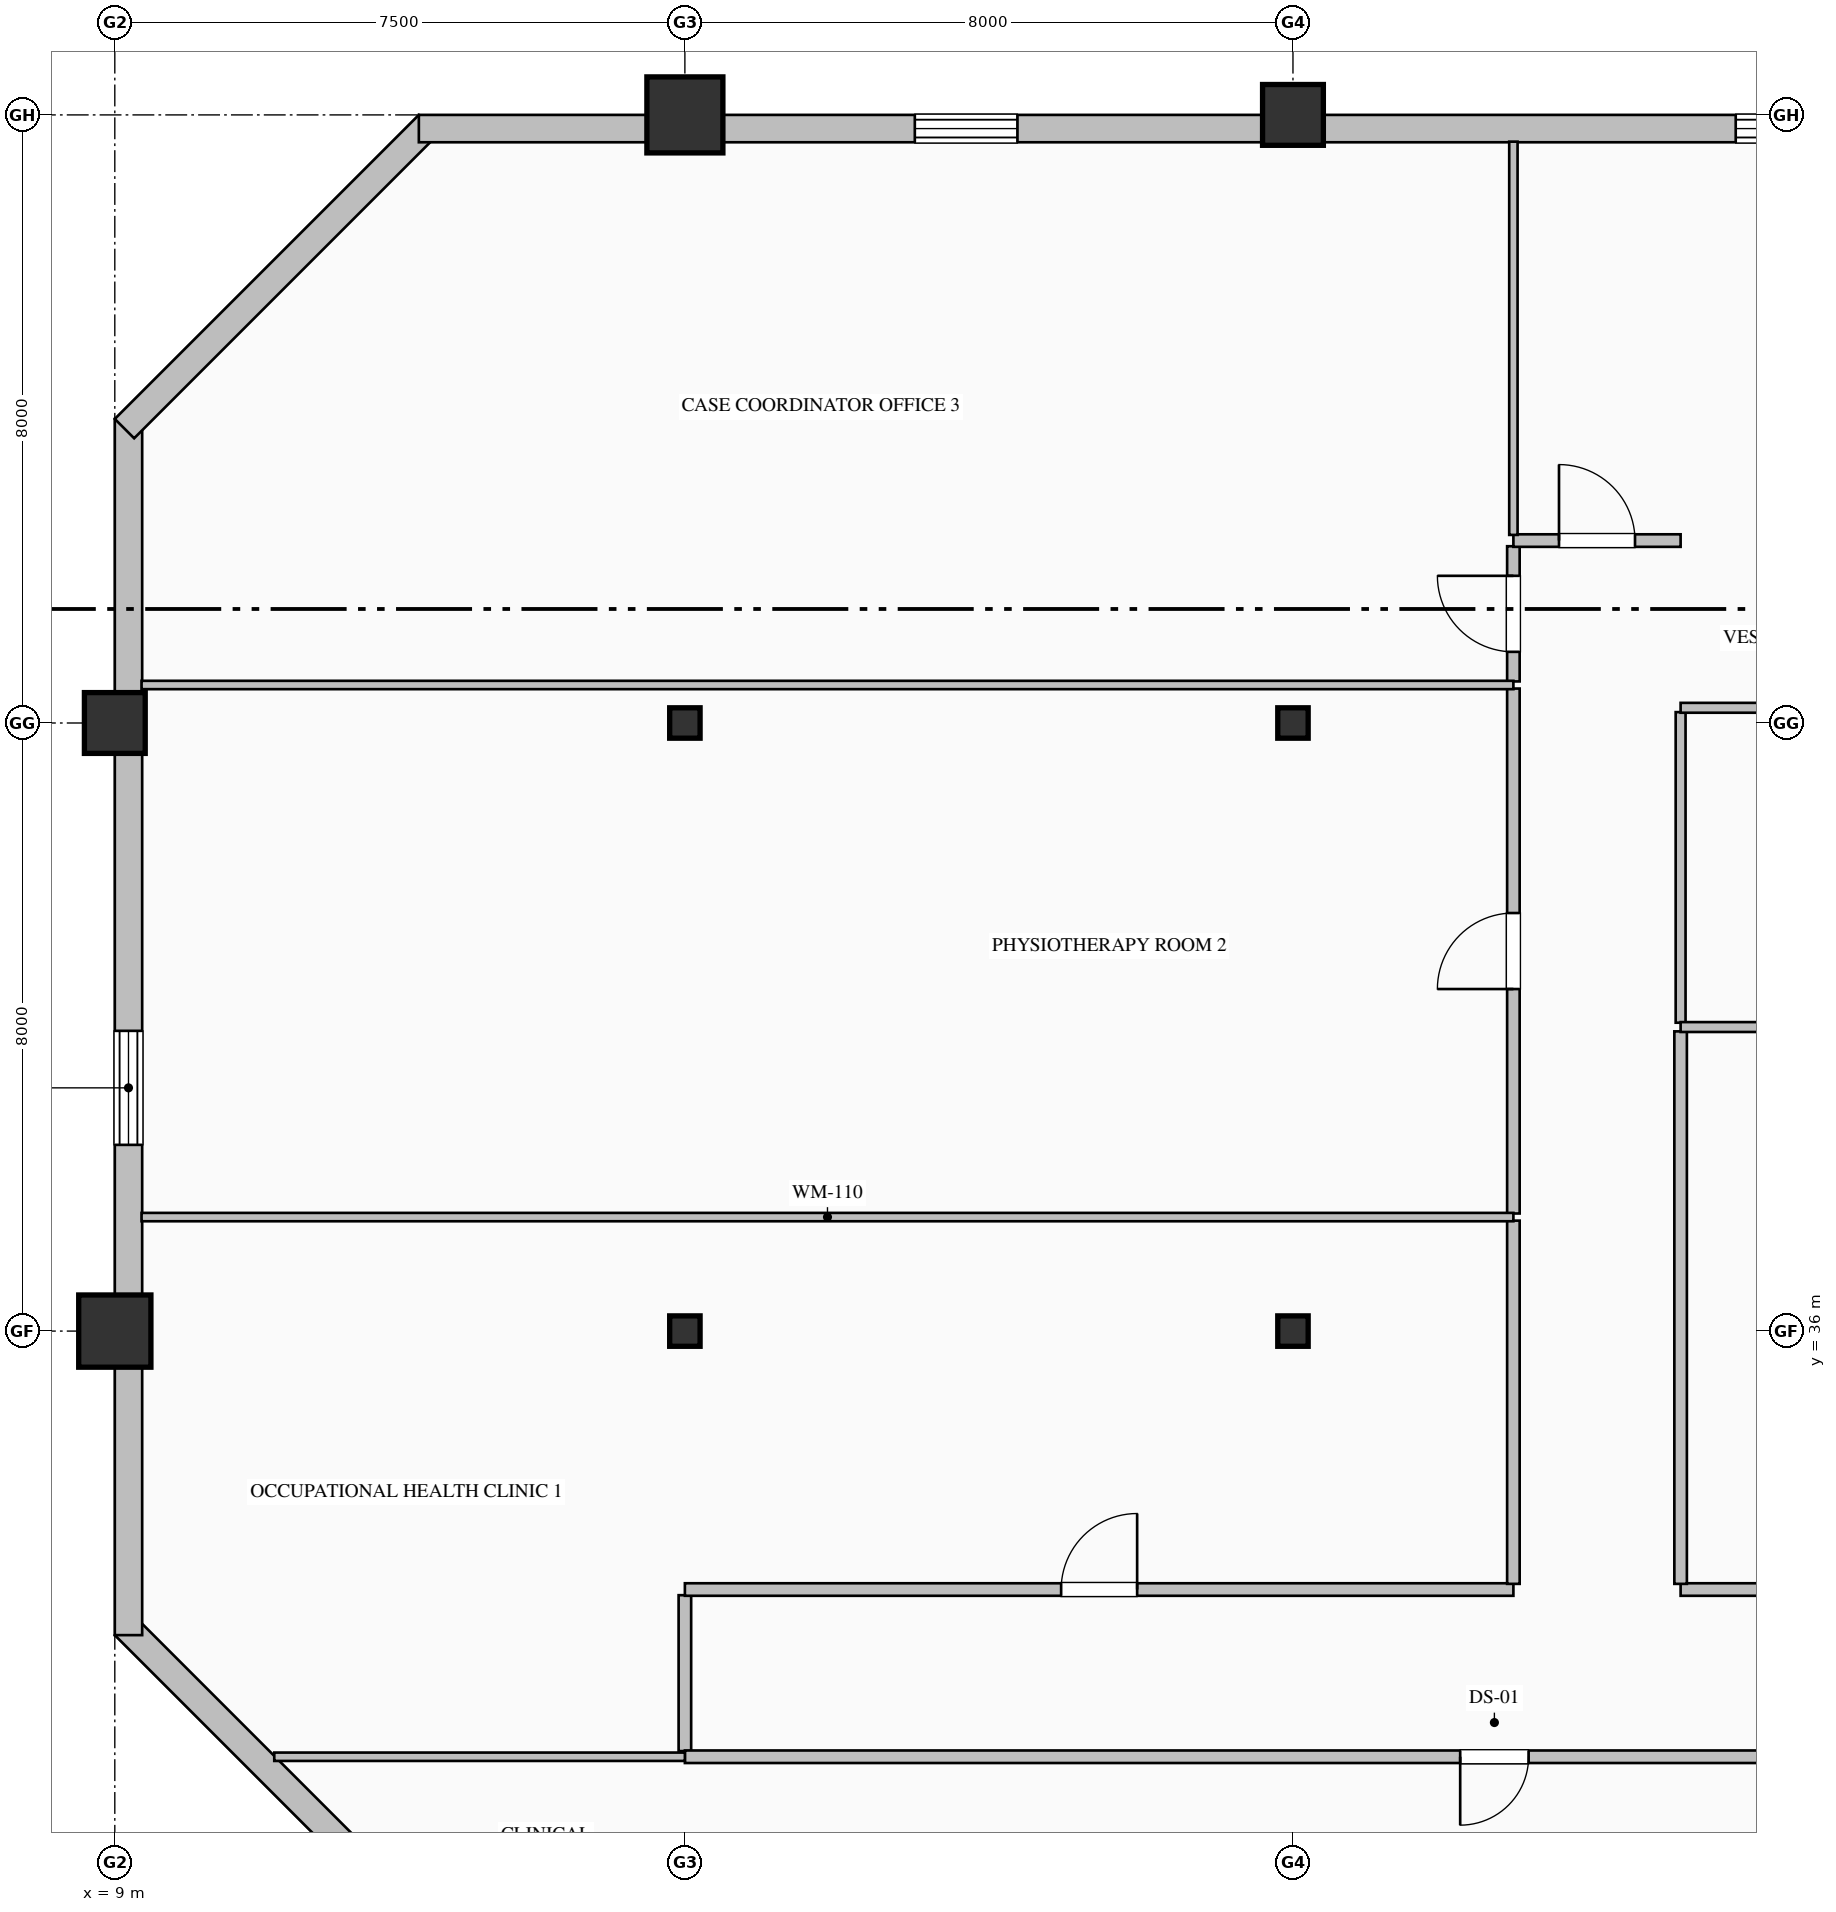
"""IFC4 building model, lengths in metres.
Left out: names, types, materials, properties, quantities, classifications, styles, units other than length and angle.
Written with IfcOpenShell. Run it as: python <this file> out.ifc"""

import sys

from ifc_helpers import new_model, si_unit, direction, frame, frame_2d, origin, origin_2d, place, context, subcontext, project, spatial, rectangle, hollow_rectangle, hollow_circle, i_section, extrude, element, fill, save


model = new_model("IFC4")
c1 = context("Model", 3, precision=1e-05, world=origin(), true_north=direction((0.0, 1.0)))
c2 = subcontext(c1, "Body", "Model", "MODEL_VIEW")
j1 = project(units=[si_unit("LENGTHUNIT", "METRE"), si_unit("PLANEANGLEUNIT", "RADIAN")], contexts=[c1])
p1 = place(None, origin())
s1 = spatial("IfcSite", under=j1, at=p1, CompositionType="ELEMENT")
p2 = place(p1, origin())
s2 = spatial("IfcBuilding", under=s1, at=p2, CompositionType="ELEMENT")
p3 = place(p2, frame((0.0, 0.0, 253.8)))
s3 = spatial("IfcBuildingStorey", under=s2, at=p3, CompositionType="ELEMENT", Elevation=253.8)
p4 = place(p3, frame((9.0, 36.0, 0.0), z_axis=(0.0, 0.0, 1.0), x_axis=(1.0, 0.0, 0.0)))
e1 = element("IfcColumn", 1, at=p4, inside=s3, PredefinedType="COLUMN", context=c2, shape_type="SweptSolid", body=[
    extrude(hollow_rectangle(XDim=0.95, YDim=0.95, WallThickness=0.036, at=origin_2d()), origin(), (0.0, 0.0, 1.0), 4.0),
])
p5 = place(p3, frame((9.0, 44.0, 0.0), z_axis=(0.0, 0.0, 1.0), x_axis=(1.0, 0.0, 0.0)))
e2 = element("IfcColumn", 2, at=p5, inside=s3, PredefinedType="COLUMN", context=c2, shape_type="SweptSolid", body=[
    extrude(hollow_rectangle(XDim=0.8, YDim=0.8, WallThickness=0.032, at=origin_2d()), origin(), (0.0, 0.0, 1.0), 4.0),
])
for number, where, z_axis, x_axis in (
    (3, (16.5, 36.0, 0.0), (0.0, 0.0, 1.0), (1.0, 0.0, 0.0)),
    (4, (16.5, 44.0, 0.0), (0.0, 0.0, 1.0), (1.0, 0.0, 0.0)),
):
    element("IfcColumn", number, at=place(p3, frame(where, z_axis=z_axis, x_axis=x_axis)), inside=s3, PredefinedType="COLUMN", context=c2, shape_type="SweptSolid", body=[
        extrude(i_section(OverallWidth=0.4, OverallDepth=0.4, WebThickness=0.013, FlangeThickness=0.021, FilletRadius=0.022, at=origin_2d()), origin(), (0.0, 0.0, 1.0), 4.0),
    ])
p6 = place(p3, frame((16.5, 52.0, 0.0), z_axis=(0.0, 0.0, 1.0), x_axis=(1.0, 0.0, 0.0)))
e5 = element("IfcColumn", 5, at=p6, inside=s3, PredefinedType="COLUMN", context=c2, shape_type="SweptSolid", body=[
    extrude(hollow_circle(Radius=0.5, WallThickness=0.036, at=origin_2d()), origin(), (0.0, 0.0, 1.0), 4.0),
])
for number, where, z_axis, x_axis in (
    (6, (24.5, 36.0, 0.0), (0.0, 0.0, 1.0), (1.0, 0.0, 0.0)),
    (7, (24.5, 44.0, 0.0), (0.0, 0.0, 1.0), (1.0, 0.0, 0.0)),
):
    element("IfcColumn", number, at=place(p3, frame(where, z_axis=z_axis, x_axis=x_axis)), inside=s3, PredefinedType="COLUMN", context=c2, shape_type="SweptSolid", body=[
        extrude(i_section(OverallWidth=0.4, OverallDepth=0.4, WebThickness=0.013, FlangeThickness=0.021, FilletRadius=0.022, at=origin_2d()), origin(), (0.0, 0.0, 1.0), 4.0),
    ])
p7 = place(p3, frame((24.5, 52.0, 0.0), z_axis=(0.0, 0.0, 1.0), x_axis=(1.0, 0.0, 0.0)))
e8 = element("IfcColumn", 8, at=p7, inside=s3, PredefinedType="COLUMN", context=c2, shape_type="SweptSolid", body=[
    extrude(hollow_rectangle(XDim=0.8, YDim=0.8, WallThickness=0.032, at=origin_2d()), origin(), (0.0, 0.0, 1.0), 4.0),
])
p8 = place(p3, frame((13.127, 28.127, 0.0), z_axis=(0.0, 0.0, 1.0), x_axis=(-0.707106781187, 0.707106781187, 0.0)))
e9 = element("IfcWall", 9, at=p8, inside=s3, PredefinedType="SOLIDWALL", context=c2, shape_type="SweptSolid", body=[
    extrude(rectangle(XDim=5.657, YDim=0.36, at=frame_2d((2.828, 0.0))), origin(), (0.0, 0.0, 1.0), 3.775),
])
p9 = place(p3, frame((9.18, 32.0, 0.0), z_axis=(0.0, 0.0, 1.0), x_axis=(0.0, 1.0, 0.0)))
e10 = element("IfcWall", 10, at=p9, inside=s3, PredefinedType="SOLIDWALL", context=c2, shape_type="SweptSolid", body=[
    extrude(rectangle(XDim=16.0, YDim=0.36, at=frame_2d((8.0, 0.0))), origin(), (0.0, 0.0, 1.0), 3.325),
])
p10 = place(p9, frame((6.45, 0.0, 0.7)))
e11 = element("IfcOpeningElement", 11, at=p10, cuts=e10, PredefinedType="OPENING", context=c2, shape_type="SweptSolid", body=[
    extrude(rectangle(XDim=1.5, YDim=2.4, at=frame_2d((0.75, 1.2))), frame((0.0, 0.19, 0.0), z_axis=(0.0, -1.0, 0.0), x_axis=(1.0, 0.0, 0.0)), (0.0, 0.0, 1.0), 0.38),
])
p11 = place(p3, frame((9.127, 47.873, 0.0), z_axis=(0.0, 0.0, 1.0), x_axis=(0.707106781187, 0.707106781187, 0.0)))
e12 = element("IfcWall", 12, at=p11, inside=s3, PredefinedType="SOLIDWALL", context=c2, shape_type="SweptSolid", body=[
    extrude(rectangle(XDim=5.657, YDim=0.36, at=frame_2d((2.828, 0.0))), origin(), (0.0, 0.0, 1.0), 3.775),
])
p12 = place(p3, frame((13.0, 51.82, 0.0), z_axis=(0.0, 0.0, 1.0), x_axis=(1.0, 0.0, 0.0)))
e13 = element("IfcWall", 13, at=p12, inside=s3, PredefinedType="SOLIDWALL", context=c2, shape_type="SweptSolid", body=[
    extrude(rectangle(XDim=27.52, YDim=0.36, at=frame_2d((13.76, 0.0))), origin(), (0.0, 0.0, 1.0), 3.325),
])
p13 = place(p12, frame((6.525, 0.0, 0.9)))
e14 = element("IfcOpeningElement", 14, at=p13, cuts=e13, PredefinedType="OPENING", context=c2, shape_type="SweptSolid", body=[
    extrude(rectangle(XDim=1.35, YDim=1.85, at=frame_2d((0.675, 0.925))), frame((0.0, 0.19, 0.0), z_axis=(0.0, -1.0, 0.0), x_axis=(1.0, 0.0, 0.0)), (0.0, 0.0, 1.0), 0.38),
])
p14 = place(p12, frame((17.325, 0.0, 0.9)))
e15 = element("IfcOpeningElement", 15, at=p14, cuts=e13, PredefinedType="OPENING", context=c2, shape_type="SweptSolid", body=[
    extrude(rectangle(XDim=1.35, YDim=1.85, at=frame_2d((0.675, 0.925))), frame((0.0, 0.19, 0.0), z_axis=(0.0, -1.0, 0.0), x_axis=(1.0, 0.0, 0.0)), (0.0, 0.0, 1.0), 0.38),
])
p15 = place(p3, frame((16.5, 30.475, 0.0), z_axis=(0.0, 0.0, 1.0), x_axis=(0.0, 1.0, 0.0)))
e16 = element("IfcWall", 16, at=p15, inside=s3, PredefinedType="PARTITIONING", context=c2, shape_type="SweptSolid", body=[
    extrude(rectangle(XDim=2.051, YDim=0.165, at=frame_2d((1.025, 0.0))), origin(), (0.0, 0.0, 1.0), 3.179),
])
p16 = place(p3, frame((16.5, 32.6, 0.0), z_axis=(0.0, 0.0, 1.0), x_axis=(1.0, 0.0, 0.0)))
e17 = element("IfcWall", 17, at=p16, inside=s3, PredefinedType="PARTITIONING", context=c2, shape_type="SweptSolid", body=[
    extrude(rectangle(XDim=10.9, YDim=0.165, at=frame_2d((5.45, 0.0))), origin(), (0.0, 0.0, 1.0), 3.775),
])
p17 = place(p16, frame((4.95, 0.0, 0.0)))
e18 = element("IfcOpeningElement", 18, at=p17, cuts=e17, PredefinedType="OPENING", context=c2, shape_type="SweptSolid", body=[
    extrude(rectangle(XDim=1.0, YDim=2.15, at=frame_2d((0.5, 1.075))), frame((0.0, 0.093, 0.0), z_axis=(0.0, -1.0, 0.0), x_axis=(1.0, 0.0, 0.0)), (0.0, 0.0, 1.0), 0.185),
])
p18 = place(p3, frame((29.6, 32.6, 0.0), z_axis=(0.0, 0.0, 1.0), x_axis=(1.0, 0.0, 0.0)))
e19 = element("IfcWall", 19, at=p18, inside=s3, PredefinedType="PARTITIONING", context=c2, shape_type="SweptSolid", body=[
    extrude(rectangle(XDim=8.2, YDim=0.165, at=frame_2d((4.1, 0.0))), origin(), (0.0, 0.0, 1.0), 3.775),
])
p19 = place(p18, frame((3.6, 0.0, 0.0)))
e20 = element("IfcOpeningElement", 20, at=p19, cuts=e19, PredefinedType="OPENING", context=c2, shape_type="SweptSolid", body=[
    extrude(rectangle(XDim=1.0, YDim=2.15, at=frame_2d((0.5, 1.075))), frame((0.0, 0.093, 0.0), z_axis=(0.0, -1.0, 0.0), x_axis=(1.0, 0.0, 0.0)), (0.0, 0.0, 1.0), 0.185),
])
p20 = place(p3, frame((37.8, 30.4, 0.0), z_axis=(0.0, 0.0, 1.0), x_axis=(-1.0, 0.0, 0.0)))
e21 = element("IfcWall", 21, at=p20, inside=s3, PredefinedType="PARTITIONING", context=c2, shape_type="SweptSolid", body=[
    extrude(rectangle(XDim=21.3, YDim=0.165, at=frame_2d((10.65, 0.0))), origin(), (0.0, 0.0, 1.0), 3.775),
])
p21 = place(p20, frame((10.2, 0.0, 0.0)))
e22 = element("IfcOpeningElement", 22, at=p21, cuts=e21, PredefinedType="OPENING", context=c2, shape_type="SweptSolid", body=[
    extrude(rectangle(XDim=0.9, YDim=2.15, at=frame_2d((0.45, 1.075))), frame((0.0, 0.093, 0.0), z_axis=(0.0, -1.0, 0.0), x_axis=(1.0, 0.0, 0.0)), (0.0, 0.0, 1.0), 0.185),
])
p22 = place(p3, frame((27.4, 32.675, 0.0), z_axis=(0.0, 0.0, 1.0), x_axis=(0.0, 1.0, 0.0)))
e23 = element("IfcWall", 23, at=p22, inside=s3, PredefinedType="PARTITIONING", context=c2, shape_type="SweptSolid", body=[
    extrude(rectangle(XDim=4.778, YDim=0.165, at=frame_2d((2.389, 0.0))), origin(), (0.0, 0.0, 1.0), 3.775),
])
p23 = place(p3, frame((27.4, 37.547, 0.0), z_axis=(0.0, 0.0, 1.0), x_axis=(0.0, 1.0, 0.0)))
e24 = element("IfcWall", 24, at=p23, inside=s3, PredefinedType="PARTITIONING", context=c2, shape_type="SweptSolid", body=[
    extrude(rectangle(XDim=6.906, YDim=0.165, at=frame_2d((3.453, 0.0))), origin(), (0.0, 0.0, 1.0), 3.775),
])
p24 = place(p23, frame((2.953, 0.0, 0.0)))
e25 = element("IfcOpeningElement", 25, at=p24, cuts=e24, PredefinedType="OPENING", context=c2, shape_type="SweptSolid", body=[
    extrude(rectangle(XDim=1.0, YDim=2.15, at=frame_2d((0.5, 1.075))), frame((0.0, 0.093, 0.0), z_axis=(0.0, -1.0, 0.0), x_axis=(1.0, 0.0, 0.0)), (0.0, 0.0, 1.0), 0.185),
])
p25 = place(p3, frame((27.4, 44.547, 0.0), z_axis=(0.0, 0.0, 1.0), x_axis=(0.0, 1.0, 0.0)))
e26 = element("IfcWall", 26, at=p25, inside=s3, PredefinedType="PARTITIONING", context=c2, shape_type="SweptSolid", body=[
    extrude(rectangle(XDim=1.778, YDim=0.165, at=frame_2d((0.889, 0.0))), origin(), (0.0, 0.0, 1.0), 3.775),
])
p26 = place(p25, frame((0.389, 0.0, 0.0)))
e27 = element("IfcOpeningElement", 27, at=p26, cuts=e26, PredefinedType="OPENING", context=c2, shape_type="SweptSolid", body=[
    extrude(rectangle(XDim=1.0, YDim=2.15, at=frame_2d((0.5, 1.075))), frame((0.0, 0.093, 0.0), z_axis=(0.0, -1.0, 0.0), x_axis=(1.0, 0.0, 0.0)), (0.0, 0.0, 1.0), 0.185),
])
p27 = place(p3, frame((27.4, 46.4, 0.0), z_axis=(0.0, 0.0, 1.0), x_axis=(1.0, 0.0, 0.0)))
e28 = element("IfcWall", 28, at=p27, inside=s3, PredefinedType="PARTITIONING", context=c2, shape_type="SweptSolid", body=[
    extrude(rectangle(XDim=2.2, YDim=0.165, at=frame_2d((1.1, 0.0))), origin(), (0.0, 0.0, 1.0), 3.775),
])
p28 = place(p27, frame((0.6, 0.0, 0.0)))
e29 = element("IfcOpeningElement", 29, at=p28, cuts=e28, PredefinedType="OPENING", context=c2, shape_type="SweptSolid", body=[
    extrude(rectangle(XDim=1.0, YDim=2.15, at=frame_2d((0.5, 1.075))), frame((0.0, 0.093, 0.0), z_axis=(0.0, -1.0, 0.0), x_axis=(1.0, 0.0, 0.0)), (0.0, 0.0, 1.0), 0.185),
])
p29 = place(p3, frame((29.6, 39.943, 0.0), z_axis=(0.0, 0.0, 1.0), x_axis=(0.0, -1.0, 0.0)))
e30 = element("IfcWall", 30, at=p29, inside=s3, PredefinedType="PARTITIONING", context=c2, shape_type="SweptSolid", body=[
    extrude(rectangle(XDim=7.269, YDim=0.165, at=frame_2d((3.634, 0.0))), origin(), (0.0, 0.0, 1.0), 3.775),
])
p30 = place(p3, frame((29.6, 44.143, 0.0), z_axis=(0.0, 0.0, 1.0), x_axis=(0.0, -1.0, 0.0)))
e31 = element("IfcWall", 31, at=p30, inside=s3, PredefinedType="PARTITIONING", context=c2, shape_type="SweptSolid", body=[
    extrude(rectangle(XDim=4.086, YDim=0.13, at=frame_2d((2.043, 0.0))), origin(), (0.0, 0.0, 1.0), 3.775),
])
p31 = place(p3, frame((37.8, 44.2, 0.0), z_axis=(0.0, 0.0, 1.0), x_axis=(-1.0, 0.0, 0.0)))
e32 = element("IfcWall", 32, at=p31, inside=s3, PredefinedType="PARTITIONING", context=c2, shape_type="SweptSolid", body=[
    extrude(rectangle(XDim=8.2, YDim=0.13, at=frame_2d((4.1, 0.0))), origin(), (0.0, 0.0, 1.0), 3.775),
])
p32 = place(p31, frame((3.6, 0.0, 0.0)))
e33 = element("IfcOpeningElement", 33, at=p32, cuts=e32, PredefinedType="OPENING", context=c2, shape_type="SweptSolid", body=[
    extrude(rectangle(XDim=1.0, YDim=2.15, at=frame_2d((0.5, 1.075))), frame((0.0, 0.075, 0.0), z_axis=(0.0, -1.0, 0.0), x_axis=(1.0, 0.0, 0.0)), (0.0, 0.0, 1.0), 0.15),
])
p33 = place(p3, frame((9.352, 37.5, 0.0), z_axis=(0.0, 0.0, 1.0), x_axis=(1.0, 0.0, 0.0)))
e34 = element("IfcWall", 34, at=p33, inside=s3, PredefinedType="MOVABLE", context=c2, shape_type="SweptSolid", body=[
    extrude(rectangle(XDim=18.048, YDim=0.11, at=frame_2d((9.024, 0.0))), origin(), (0.0, 0.0, 1.0), 3.775),
])
p34 = place(p3, frame((16.5, 30.4, 0.0), z_axis=(0.0, 0.0, 1.0), x_axis=(-1.0, 0.0, 0.0)))
e35 = element("IfcWall", 35, at=p34, inside=s3, PredefinedType="MOVABLE", context=c2, shape_type="SweptSolid", body=[
    extrude(rectangle(XDim=5.402, YDim=0.11, at=frame_2d((2.701, 0.0))), origin(), (0.0, 0.0, 1.0), 3.775),
])
p35 = place(p3, frame((9.352, 44.5, 0.0), z_axis=(0.0, 0.0, 1.0), x_axis=(1.0, 0.0, 0.0)))
e36 = element("IfcWall", 36, at=p35, inside=s3, PredefinedType="MOVABLE", context=c2, shape_type="SweptSolid", body=[
    extrude(rectangle(XDim=18.048, YDim=0.11, at=frame_2d((9.024, 0.0))), origin(), (0.0, 0.0, 1.0), 3.775),
])
p36 = place(p3, frame((27.4, 51.648, 0.0), z_axis=(0.0, 0.0, 1.0), x_axis=(0.0, -1.0, 0.0)))
e37 = element("IfcWall", 37, at=p36, inside=s3, PredefinedType="MOVABLE", context=c2, shape_type="SweptSolid", body=[
    extrude(rectangle(XDim=5.173, YDim=0.11, at=frame_2d((2.587, 0.0))), origin(), (0.0, 0.0, 1.0), 3.775),
])
p37 = place(p3, frame((29.6, 40.0, 0.0), z_axis=(0.0, 0.0, 1.0), x_axis=(1.0, 0.0, 0.0)))
e38 = element("IfcWall", 38, at=p37, inside=s3, PredefinedType="PARTITIONING", context=c2, shape_type="SweptSolid", body=[
    extrude(rectangle(XDim=8.2, YDim=0.13, at=frame_2d((4.1, 0.0))), origin(), (0.0, 0.0, 1.0), 3.775),
])
p38 = place(p10, origin())
e39 = element("IfcWindow", 39, at=p38, inside=s3, PartitioningType="DOUBLE_PANEL_HORIZONTAL", PredefinedType="WINDOW", context=c2, shape_type="SweptSolid", body=[
    extrude(rectangle(XDim=1.5, YDim=2.4, at=frame_2d((0.75, 1.2))), frame((0.0, 0.15, 0.0), z_axis=(0.0, -1.0, 0.0), x_axis=(1.0, 0.0, 0.0)), (0.0, 0.0, 1.0), 0.06),
])
fill(e11, e39)
p39 = place(p13, origin())
e40 = element("IfcWindow", 40, at=p39, inside=s3, PartitioningType="DOUBLE_PANEL_VERTICAL", PredefinedType="WINDOW", context=c2, shape_type="SweptSolid", body=[
    extrude(rectangle(XDim=1.35, YDim=1.85, at=frame_2d((0.675, 0.925))), frame((0.0, 0.15, 0.0), z_axis=(0.0, -1.0, 0.0), x_axis=(1.0, 0.0, 0.0)), (0.0, 0.0, 1.0), 0.06),
])
fill(e14, e40)
p40 = place(p14, origin())
e41 = element("IfcWindow", 41, at=p40, inside=s3, PartitioningType="DOUBLE_PANEL_VERTICAL", PredefinedType="WINDOW", context=c2, shape_type="SweptSolid", body=[
    extrude(rectangle(XDim=1.35, YDim=1.85, at=frame_2d((0.675, 0.925))), frame((0.0, 0.15, 0.0), z_axis=(0.0, -1.0, 0.0), x_axis=(1.0, 0.0, 0.0)), (0.0, 0.0, 1.0), 0.06),
])
fill(e15, e41)
p41 = place(p17, origin())
e42 = element("IfcDoor", 42, at=p41, inside=s3, OperationType="SINGLE_SWING_RIGHT", PredefinedType="DOOR", context=c2, shape_type="SweptSolid", body=[
    extrude(rectangle(XDim=1.0, YDim=2.15, at=frame_2d((0.5, 1.075))), frame((0.0, 0.025, 0.0), z_axis=(0.0, -1.0, 0.0), x_axis=(1.0, 0.0, 0.0)), (0.0, 0.0, 1.0), 0.05),
])
fill(e18, e42)
p42 = place(p24, origin())
e43 = element("IfcDoor", 43, at=p42, inside=s3, OperationType="SINGLE_SWING_LEFT", PredefinedType="DOOR", context=c2, shape_type="SweptSolid", body=[
    extrude(rectangle(XDim=1.0, YDim=2.15, at=frame_2d((0.5, 1.075))), frame((0.0, 0.025, 0.0), z_axis=(0.0, -1.0, 0.0), x_axis=(1.0, 0.0, 0.0)), (0.0, 0.0, 1.0), 0.05),
])
fill(e25, e43)
p43 = place(p26, origin())
e44 = element("IfcDoor", 44, at=p43, inside=s3, OperationType="SINGLE_SWING_RIGHT", PredefinedType="DOOR", context=c2, shape_type="SweptSolid", body=[
    extrude(rectangle(XDim=1.0, YDim=2.15, at=frame_2d((0.5, 1.075))), frame((0.0, 0.025, 0.0), z_axis=(0.0, -1.0, 0.0), x_axis=(1.0, 0.0, 0.0)), (0.0, 0.0, 1.0), 0.05),
])
fill(e27, e44)
p44 = place(p28, origin())
e45 = element("IfcDoor", 45, at=p44, inside=s3, OperationType="SINGLE_SWING_LEFT", PredefinedType="DOOR", context=c2, shape_type="SweptSolid", body=[
    extrude(rectangle(XDim=1.0, YDim=2.15, at=frame_2d((0.5, 1.075))), frame((0.0, 0.025, 0.0), z_axis=(0.0, -1.0, 0.0), x_axis=(1.0, 0.0, 0.0)), (0.0, 0.0, 1.0), 0.05),
])
fill(e29, e45)
p45 = place(p21, origin())
e46 = element("IfcDoor", 46, at=p45, inside=s3, OperationType="SINGLE_SWING_RIGHT", PredefinedType="DOOR", context=c2, shape_type="SweptSolid", body=[
    extrude(rectangle(XDim=0.9, YDim=2.15, at=frame_2d((0.45, 1.075))), frame((0.0, 0.025, 0.0), z_axis=(0.0, -1.0, 0.0), x_axis=(1.0, 0.0, 0.0)), (0.0, 0.0, 1.0), 0.05),
])
fill(e22, e46)
save(model, sys.argv[1])
